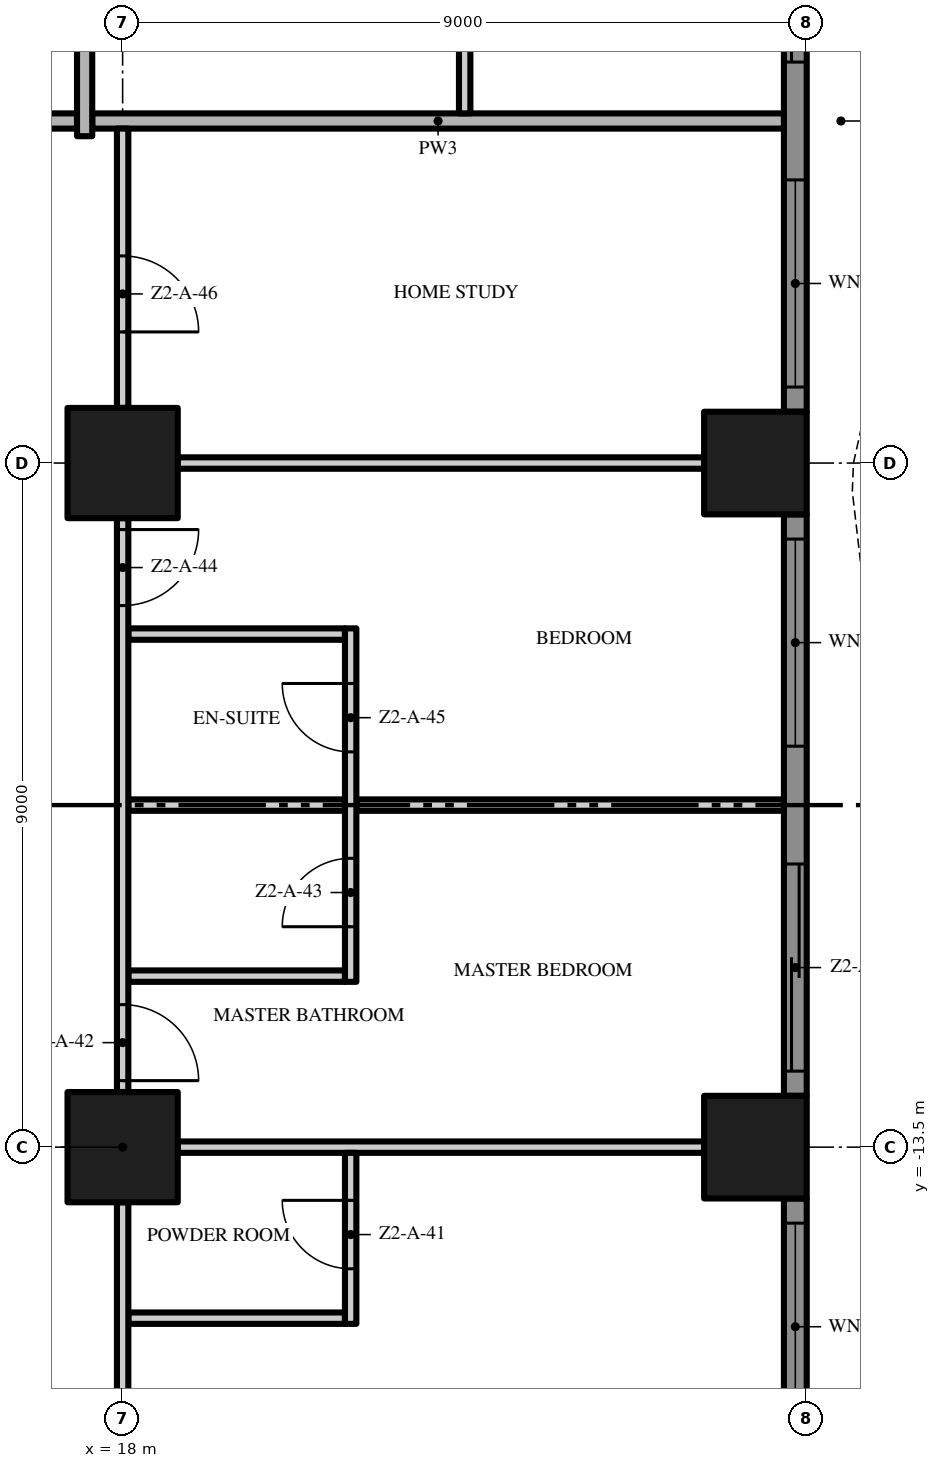
"""IFC4 building model, lengths in metres.
Left out: names, types, materials, properties, quantities, classifications, styles, units other than length and angle.
Written with IfcOpenShell. Run it as: python <this file> out.ifc"""

import sys

from ifc_helpers import new_model, si_unit, direction, frame, frame_2d, origin, origin_2d, place, context, subcontext, project, spatial, polyline, rectangle, outline, extrude, element, fill, save


model = new_model("IFC4")
c1 = context("Model", 3, precision=1e-05, world=origin(), true_north=direction((0.0, 1.0)))
c2 = subcontext(c1, "Body", "Model", "MODEL_VIEW")
j1 = project(units=[si_unit("LENGTHUNIT", "METRE"), si_unit("PLANEANGLEUNIT", "RADIAN")], contexts=[c1])
p1 = place(None, origin())
s1 = spatial("IfcSite", under=j1, at=p1, CompositionType="ELEMENT")
p2 = place(p1, origin())
s2 = spatial("IfcBuilding", under=s1, at=p2, CompositionType="ELEMENT")
p3 = place(p2, frame((0.0, 0.0, 73.2)))
s3 = spatial("IfcBuildingStorey", under=s2, at=p3, CompositionType="ELEMENT", Elevation=73.2)
for number, where, z_axis, x_axis in (
    (1, (18.0, -13.5, 0.0), (0.0, 0.0, 1.0), (1.0, 0.0, 0.0)),
    (2, (18.0, -4.5, 0.0), (0.0, 0.0, 1.0), (1.0, 0.0, 0.0)),
):
    element("IfcColumn", number, at=place(p3, frame(where, z_axis=z_axis, x_axis=x_axis)), inside=s3, PredefinedType="COLUMN", context=c2, shape_type="SweptSolid", body=[
        extrude(rectangle(XDim=1.45, YDim=1.45, at=origin_2d()), origin(), (0.0, 0.0, 1.0), 3.5),
    ])
for number, where, z_axis, x_axis in (
    (3, (26.325, -13.5, 0.0), (0.0, 0.0, 1.0), (1.0, 0.0, 0.0)),
    (4, (26.325, -4.5, 0.0), (0.0, 0.0, 1.0), (1.0, 0.0, 0.0)),
):
    element("IfcColumn", number, at=place(p3, frame(where, z_axis=z_axis, x_axis=x_axis)), inside=s3, PredefinedType="COLUMN", context=c2, shape_type="SweptSolid", body=[
        extrude(rectangle(XDim=1.35, YDim=1.35, at=origin_2d()), origin(), (0.0, 0.0, 1.0), 3.5),
    ])
p4 = place(p3, frame((26.85, -14.175, 0.0), z_axis=(0.0, 0.0, 1.0), x_axis=(0.0, -1.0, 0.0)))
e5 = element("IfcWall", 5, at=p4, inside=s3, PredefinedType="SOLIDWALL", context=c2, shape_type="SweptSolid", body=[
    extrude(rectangle(XDim=3.525, YDim=0.3, at=frame_2d((1.762, 0.0))), origin(), (0.0, 0.0, 1.0), 3.5),
])
p5 = place(p4, frame((0.325, 0.0, 0.45)))
e6 = element("IfcOpeningElement", 6, at=p5, cuts=e5, PredefinedType="OPENING", context=c2, shape_type="SweptSolid", body=[
    extrude(rectangle(XDim=2.725, YDim=2.65, at=frame_2d((1.363, 1.325))), frame((0.0, 0.16, 0.0), z_axis=(0.0, -1.0, 0.0), x_axis=(1.0, 0.0, 0.0)), (0.0, 0.0, 1.0), 0.32),
])
p6 = place(p3, frame((26.85, -5.175, 0.0), z_axis=(0.0, 0.0, 1.0), x_axis=(0.0, -1.0, 0.0)))
e7 = element("IfcWall", 7, at=p6, inside=s3, PredefinedType="SOLIDWALL", context=c2, shape_type="SweptSolid", body=[
    extrude(rectangle(XDim=7.65, YDim=0.3, at=frame_2d((3.825, 0.0))), origin(), (0.0, 0.0, 1.0), 3.5),
])
p7 = place(p6, frame((4.6, 0.0, 0.0)))
e8 = element("IfcOpeningElement", 8, at=p7, cuts=e7, PredefinedType="OPENING", context=c2, shape_type="SweptSolid", body=[
    extrude(rectangle(XDim=2.725, YDim=2.4, at=frame_2d((1.363, 1.2))), frame((0.0, 0.16, 0.0), z_axis=(0.0, -1.0, 0.0), x_axis=(1.0, 0.0, 0.0)), (0.0, 0.0, 1.0), 0.32),
])
p8 = place(p6, frame((0.325, 0.0, 0.45)))
e9 = element("IfcOpeningElement", 9, at=p8, cuts=e7, PredefinedType="OPENING", context=c2, shape_type="SweptSolid", body=[
    extrude(rectangle(XDim=2.725, YDim=2.65, at=frame_2d((1.363, 1.325))), frame((0.0, 0.16, 0.0), z_axis=(0.0, -1.0, 0.0), x_axis=(1.0, 0.0, 0.0)), (0.0, 0.0, 1.0), 0.32),
])
p9 = place(p3, frame((26.85, 3.825, 0.0), z_axis=(0.0, 0.0, 1.0), x_axis=(0.0, -1.0, 0.0)))
e10 = element("IfcWall", 10, at=p9, inside=s3, PredefinedType="SOLIDWALL", context=c2, shape_type="SweptSolid", body=[
    extrude(rectangle(XDim=7.65, YDim=0.3, at=frame_2d((3.825, 0.0))), origin(), (0.0, 0.0, 1.0), 3.5),
])
p10 = place(p9, frame((4.6, 0.0, 0.45)))
e11 = element("IfcOpeningElement", 11, at=p10, cuts=e10, PredefinedType="OPENING", context=c2, shape_type="SweptSolid", body=[
    extrude(rectangle(XDim=2.725, YDim=2.65, at=frame_2d((1.363, 1.325))), frame((0.0, 0.16, 0.0), z_axis=(0.0, -1.0, 0.0), x_axis=(1.0, 0.0, 0.0)), (0.0, 0.0, 1.0), 0.32),
])
p11 = place(p9, frame((0.325, 0.0, 0.0)))
e12 = element("IfcOpeningElement", 12, at=p11, cuts=e10, PredefinedType="OPENING", context=c2, shape_type="SweptSolid", body=[
    extrude(rectangle(XDim=2.725, YDim=2.4, at=frame_2d((1.363, 1.2))), frame((0.0, 0.16, 0.0), z_axis=(0.0, -1.0, 0.0), x_axis=(1.0, 0.0, 0.0)), (0.0, 0.0, 1.0), 0.32),
])
p12 = place(p3, origin())
e13 = element("IfcWall", 13, at=p12, inside=s3, PredefinedType="USERDEFINED", context=c2, shape_type="SweptSolid", body=[
    extrude(outline(polyline([(27.951, -18.0), (28.612, -16.5), (29.345, -15.0), (29.869, -13.5), (30.0, -12.375), (29.985, -12.0), (29.649, -10.5), (28.988, -9.0), (28.255, -7.5), (27.731, -6.0), (27.6, -4.875), (27.615, -4.5), (27.951, -3.0), (28.612, -1.5), (29.345, 0.0), (29.869, 1.5), (30.0, 2.625), (29.985, 3.0), (29.649, 4.5), (28.988, 6.0), (28.255, 7.5), (27.731, 9.0), (27.6, 10.125), (27.615, 10.5), (27.951, 12.0), (28.612, 13.5), (29.345, 15.0), (29.869, 16.5), (30.0, 17.625), (29.985, 18.0), (29.735, 17.99), (29.749, 17.635), (29.624, 16.556), (29.114, 15.096), (28.385, 13.605), (27.713, 12.079), (27.366, 10.533), (27.349, 10.115), (27.486, 8.944), (28.024, 7.404), (28.761, 5.895), (29.41, 4.421), (29.736, 2.967), (29.749, 2.635), (29.624, 1.556), (29.114, 0.096), (28.385, -1.395), (27.713, -2.921), (27.366, -4.467), (27.349, -4.885), (27.486, -6.056), (28.024, -7.596), (28.761, -9.105), (29.41, -10.579), (29.736, -12.033), (29.749, -12.365), (29.624, -13.444), (29.114, -14.904), (28.385, -16.395), (27.723, -17.899), (27.951, -18.0)])), origin(), (0.0, 0.0, 1.0), 0.9),
])
p13 = place(p3, frame((18.075, -15.75, 0.0), z_axis=(0.0, 0.0, 1.0), x_axis=(1.0, 0.0, 0.0)))
e14 = element("IfcWall", 14, at=p13, inside=s3, PredefinedType="PARTITIONING", context=c2, shape_type="SweptSolid", body=[
    extrude(rectangle(XDim=2.85, YDim=0.15, at=frame_2d((1.425, 0.0))), origin(), (0.0, 0.0, 1.0), 3.5),
])
p14 = place(p3, frame((18.725, -13.5, 0.0), z_axis=(0.0, 0.0, 1.0), x_axis=(1.0, 0.0, 0.0)))
e15 = element("IfcWall", 15, at=p14, inside=s3, PredefinedType="PARTITIONING", context=c2, shape_type="SweptSolid", body=[
    extrude(rectangle(XDim=6.925, YDim=0.15, at=frame_2d((3.462, 0.0))), origin(), (0.0, 0.0, 1.0), 3.5),
])
for number, where, z_axis, x_axis in (
    (16, (18.075, -11.25, 0.0), (0.0, 0.0, 1.0), (1.0, 0.0, 0.0)),
    (17, (18.075, -9.0, 0.0), (0.0, 0.0, 1.0), (1.0, 0.0, 0.0)),
):
    element("IfcWall", number, at=place(p3, frame(where, z_axis=z_axis, x_axis=x_axis)), inside=s3, PredefinedType="PARTITIONING", context=c2, shape_type="SweptSolid", body=[
        extrude(rectangle(XDim=2.85, YDim=0.15, at=frame_2d((1.425, 0.0))), origin(), (0.0, 0.0, 1.0), 3.5),
    ])
p15 = place(p3, frame((21.075, -9.0, 0.0), z_axis=(0.0, 0.0, 1.0), x_axis=(1.0, 0.0, 0.0)))
e18 = element("IfcWall", 18, at=p15, inside=s3, PredefinedType="PARTITIONING", context=c2, shape_type="SweptSolid", body=[
    extrude(rectangle(XDim=5.625, YDim=0.15, at=frame_2d((2.812, 0.0))), origin(), (0.0, 0.0, 1.0), 3.5),
])
p16 = place(p3, frame((18.075, -6.75, 0.0), z_axis=(0.0, 0.0, 1.0), x_axis=(1.0, 0.0, 0.0)))
e19 = element("IfcWall", 19, at=p16, inside=s3, PredefinedType="PARTITIONING", context=c2, shape_type="SweptSolid", body=[
    extrude(rectangle(XDim=2.85, YDim=0.15, at=frame_2d((1.425, 0.0))), origin(), (0.0, 0.0, 1.0), 3.5),
])
p17 = place(p3, frame((18.725, -4.5, 0.0), z_axis=(0.0, 0.0, 1.0), x_axis=(1.0, 0.0, 0.0)))
e20 = element("IfcWall", 20, at=p17, inside=s3, PredefinedType="PARTITIONING", context=c2, shape_type="SweptSolid", body=[
    extrude(rectangle(XDim=6.925, YDim=0.15, at=frame_2d((3.462, 0.0))), origin(), (0.0, 0.0, 1.0), 3.5),
])
p18 = place(p3, frame((4.6, 0.0, 0.0), z_axis=(0.0, 0.0, 1.0), x_axis=(1.0, 0.0, 0.0)))
e21 = element("IfcWall", 21, at=p18, inside=s3, PredefinedType="PARTITIONING", context=c2, shape_type="SweptSolid", body=[
    extrude(rectangle(XDim=12.8, YDim=0.2, at=frame_2d((6.4, 0.0))), origin(), (0.0, 0.0, 1.0), 3.5),
])
p19 = place(p3, frame((17.6, 0.0, 0.0), z_axis=(0.0, 0.0, 1.0), x_axis=(1.0, 0.0, 0.0)))
e22 = element("IfcWall", 22, at=p19, inside=s3, PredefinedType="PARTITIONING", context=c2, shape_type="SweptSolid", body=[
    extrude(rectangle(XDim=9.1, YDim=0.2, at=frame_2d((4.55, 0.0))), origin(), (0.0, 0.0, 1.0), 3.5),
])
p20 = place(p3, frame((17.5, -0.2, 0.0), z_axis=(0.0, 0.0, 1.0), x_axis=(0.0, 1.0, 0.0)))
e23 = element("IfcWall", 23, at=p20, inside=s3, PredefinedType="PARTITIONING", context=c2, shape_type="SweptSolid", body=[
    extrude(rectangle(XDim=3.975, YDim=0.2, at=frame_2d((1.988, 0.0))), origin(), (0.0, 0.0, 1.0), 3.5),
])
p21 = place(p3, frame((18.0, -14.225, 0.0), z_axis=(0.0, 0.0, 1.0), x_axis=(0.0, -1.0, 0.0)))
e24 = element("IfcWall", 24, at=p21, inside=s3, PredefinedType="PARTITIONING", context=c2, shape_type="SweptSolid", body=[
    extrude(rectangle(XDim=6.925, YDim=0.15, at=frame_2d((3.462, 0.0))), origin(), (0.0, 0.0, 1.0), 3.5),
])
p22 = place(p21, frame((4.025, 0.0, 0.0)))
e25 = element("IfcOpeningElement", 25, at=p22, cuts=e24, PredefinedType="OPENING", context=c2, shape_type="SweptSolid", body=[
    extrude(rectangle(XDim=1.8, YDim=2.4, at=frame_2d((0.9, 1.2))), frame((0.0, 0.085, 0.0), z_axis=(0.0, -1.0, 0.0), x_axis=(1.0, 0.0, 0.0)), (0.0, 0.0, 1.0), 0.17),
])
p23 = place(p3, frame((18.0, -5.225, 0.0), z_axis=(0.0, 0.0, 1.0), x_axis=(0.0, -1.0, 0.0)))
e26 = element("IfcWall", 26, at=p23, inside=s3, PredefinedType="PARTITIONING", context=c2, shape_type="SweptSolid", body=[
    extrude(rectangle(XDim=7.55, YDim=0.15, at=frame_2d((3.775, 0.0))), origin(), (0.0, 0.0, 1.0), 3.5),
])
p24 = place(p23, frame((6.4, 0.0, 0.0)))
e27 = element("IfcOpeningElement", 27, at=p24, cuts=e26, PredefinedType="OPENING", context=c2, shape_type="SweptSolid", body=[
    extrude(rectangle(XDim=1.0, YDim=2.4, at=frame_2d((0.5, 1.2))), frame((0.0, 0.085, 0.0), z_axis=(0.0, -1.0, 0.0), x_axis=(1.0, 0.0, 0.0)), (0.0, 0.0, 1.0), 0.17),
])
p25 = place(p23, frame((0.15, 0.0, 0.0)))
e28 = element("IfcOpeningElement", 28, at=p25, cuts=e26, PredefinedType="OPENING", context=c2, shape_type="SweptSolid", body=[
    extrude(rectangle(XDim=1.0, YDim=2.4, at=frame_2d((0.5, 1.2))), frame((0.0, 0.085, 0.0), z_axis=(0.0, -1.0, 0.0), x_axis=(1.0, 0.0, 0.0)), (0.0, 0.0, 1.0), 0.17),
])
p26 = place(p3, frame((18.0, -0.1, 0.0), z_axis=(0.0, 0.0, 1.0), x_axis=(0.0, -1.0, 0.0)))
e29 = element("IfcWall", 29, at=p26, inside=s3, PredefinedType="PARTITIONING", context=c2, shape_type="SweptSolid", body=[
    extrude(rectangle(XDim=3.675, YDim=0.15, at=frame_2d((1.837, 0.0))), origin(), (0.0, 0.0, 1.0), 3.5),
])
p27 = place(p26, frame((1.675, 0.0, 0.0)))
e30 = element("IfcOpeningElement", 30, at=p27, cuts=e29, PredefinedType="OPENING", context=c2, shape_type="SweptSolid", body=[
    extrude(rectangle(XDim=1.0, YDim=2.4, at=frame_2d((0.5, 1.2))), frame((0.0, 0.085, 0.0), z_axis=(0.0, -1.0, 0.0), x_axis=(1.0, 0.0, 0.0)), (0.0, 0.0, 1.0), 0.17),
])
p28 = place(p3, frame((21.0, -15.825, 0.0), z_axis=(0.0, 0.0, 1.0), x_axis=(0.0, 1.0, 0.0)))
e31 = element("IfcWall", 31, at=p28, inside=s3, PredefinedType="PARTITIONING", context=c2, shape_type="SweptSolid", body=[
    extrude(rectangle(XDim=2.25, YDim=0.15, at=frame_2d((1.125, 0.0))), origin(), (0.0, 0.0, 1.0), 3.5),
])
p29 = place(p28, frame((0.725, 0.0, 0.0)))
e32 = element("IfcOpeningElement", 32, at=p29, cuts=e31, PredefinedType="OPENING", context=c2, shape_type="SweptSolid", body=[
    extrude(rectangle(XDim=0.9, YDim=2.1, at=frame_2d((0.45, 1.05))), frame((0.0, 0.085, 0.0), z_axis=(0.0, -1.0, 0.0), x_axis=(1.0, 0.0, 0.0)), (0.0, 0.0, 1.0), 0.17),
])
p30 = place(p3, frame((21.0, -11.325, 0.0), z_axis=(0.0, 0.0, 1.0), x_axis=(0.0, 1.0, 0.0)))
e33 = element("IfcWall", 33, at=p30, inside=s3, PredefinedType="PARTITIONING", context=c2, shape_type="SweptSolid", body=[
    extrude(rectangle(XDim=4.65, YDim=0.15, at=frame_2d((2.325, 0.0))), origin(), (0.0, 0.0, 1.0), 3.5),
])
p31 = place(p30, frame((0.725, 0.0, 0.0)))
e34 = element("IfcOpeningElement", 34, at=p31, cuts=e33, PredefinedType="OPENING", context=c2, shape_type="SweptSolid", body=[
    extrude(rectangle(XDim=0.9, YDim=2.1, at=frame_2d((0.45, 1.05))), frame((0.0, 0.085, 0.0), z_axis=(0.0, -1.0, 0.0), x_axis=(1.0, 0.0, 0.0)), (0.0, 0.0, 1.0), 0.17),
])
p32 = place(p30, frame((3.025, 0.0, 0.0)))
e35 = element("IfcOpeningElement", 35, at=p32, cuts=e33, PredefinedType="OPENING", context=c2, shape_type="SweptSolid", body=[
    extrude(rectangle(XDim=0.9, YDim=2.1, at=frame_2d((0.45, 1.05))), frame((0.0, 0.085, 0.0), z_axis=(0.0, -1.0, 0.0), x_axis=(1.0, 0.0, 0.0)), (0.0, 0.0, 1.0), 0.17),
])
p33 = place(p3, frame((22.5, 17.325, 0.0), z_axis=(0.0, 0.0, 1.0), x_axis=(0.0, -1.0, 0.0)))
e36 = element("IfcWall", 36, at=p33, inside=s3, PredefinedType="PARTITIONING", context=c2, shape_type="SweptSolid", body=[
    extrude(rectangle(XDim=17.225, YDim=0.15, at=frame_2d((8.613, 0.0))), origin(), (0.0, 0.0, 1.0), 3.5),
])
p34 = place(p33, frame((14.575, 0.0, 0.0)))
e37 = element("IfcOpeningElement", 37, at=p34, cuts=e36, PredefinedType="OPENING", context=c2, shape_type="SweptSolid", body=[
    extrude(rectangle(XDim=1.0, YDim=2.4, at=frame_2d((0.5, 1.2))), frame((0.0, 0.085, 0.0), z_axis=(0.0, -1.0, 0.0), x_axis=(1.0, 0.0, 0.0)), (0.0, 0.0, 1.0), 0.17),
])
p35 = place(p33, frame((7.425, 0.0, 0.0)))
e38 = element("IfcOpeningElement", 38, at=p35, cuts=e36, PredefinedType="OPENING", context=c2, shape_type="SweptSolid", body=[
    extrude(rectangle(XDim=1.8, YDim=2.4, at=frame_2d((0.9, 1.2))), frame((0.0, 0.085, 0.0), z_axis=(0.0, -1.0, 0.0), x_axis=(1.0, 0.0, 0.0)), (0.0, 0.0, 1.0), 0.17),
])
p36 = place(p33, frame((0.15, 0.0, 0.0)))
e39 = element("IfcOpeningElement", 39, at=p36, cuts=e36, PredefinedType="OPENING", context=c2, shape_type="SweptSolid", body=[
    extrude(rectangle(XDim=1.0, YDim=2.4, at=frame_2d((0.5, 1.2))), frame((0.0, 0.085, 0.0), z_axis=(0.0, -1.0, 0.0), x_axis=(1.0, 0.0, 0.0)), (0.0, 0.0, 1.0), 0.17),
])
p37 = place(p5, origin())
e40 = element("IfcWindow", 40, at=p37, inside=s3, PartitioningType="SINGLE_PANEL", PredefinedType="WINDOW", context=c2, shape_type="SweptSolid", body=[
    extrude(rectangle(XDim=2.725, YDim=2.65, at=frame_2d((1.363, 1.325))), frame((0.0, 0.03, 0.0), z_axis=(0.0, -1.0, 0.0), x_axis=(1.0, 0.0, 0.0)), (0.0, 0.0, 1.0), 0.06),
])
fill(e6, e40)
p38 = place(p7, origin())
e41 = element("IfcDoor", 41, at=p38, inside=s3, OperationType="SINGLE_SWING_LEFT", PredefinedType="DOOR", context=c2, shape_type="SweptSolid", body=[
    extrude(rectangle(XDim=2.725, YDim=2.4, at=frame_2d((1.363, 1.2))), frame((0.0, 0.025, 0.0), z_axis=(0.0, -1.0, 0.0), x_axis=(1.0, 0.0, 0.0)), (0.0, 0.0, 1.0), 0.05),
])
fill(e8, e41)
p39 = place(p8, origin())
e42 = element("IfcWindow", 42, at=p39, inside=s3, PartitioningType="SINGLE_PANEL", PredefinedType="WINDOW", context=c2, shape_type="SweptSolid", body=[
    extrude(rectangle(XDim=2.725, YDim=2.65, at=frame_2d((1.363, 1.325))), frame((0.0, 0.03, 0.0), z_axis=(0.0, -1.0, 0.0), x_axis=(1.0, 0.0, 0.0)), (0.0, 0.0, 1.0), 0.06),
])
fill(e9, e42)
p40 = place(p10, origin())
e43 = element("IfcWindow", 43, at=p40, inside=s3, PartitioningType="SINGLE_PANEL", PredefinedType="WINDOW", context=c2, shape_type="SweptSolid", body=[
    extrude(rectangle(XDim=2.725, YDim=2.65, at=frame_2d((1.363, 1.325))), frame((0.0, 0.03, 0.0), z_axis=(0.0, -1.0, 0.0), x_axis=(1.0, 0.0, 0.0)), (0.0, 0.0, 1.0), 0.06),
])
fill(e11, e43)
p41 = place(p11, origin())
e44 = element("IfcDoor", 44, at=p41, inside=s3, OperationType="SINGLE_SWING_LEFT", PredefinedType="DOOR", context=c2, shape_type="SweptSolid", body=[
    extrude(rectangle(XDim=2.725, YDim=2.4, at=frame_2d((1.363, 1.2))), frame((0.0, 0.025, 0.0), z_axis=(0.0, -1.0, 0.0), x_axis=(1.0, 0.0, 0.0)), (0.0, 0.0, 1.0), 0.05),
])
fill(e12, e44)
p42 = place(p29, origin())
e45 = element("IfcDoor", 45, at=p42, inside=s3, OperationType="SINGLE_SWING_RIGHT", PredefinedType="DOOR", context=c2, shape_type="SweptSolid", body=[
    extrude(rectangle(XDim=0.9, YDim=2.1, at=frame_2d((0.45, 1.05))), frame((0.0, 0.025, 0.0), z_axis=(0.0, -1.0, 0.0), x_axis=(1.0, 0.0, 0.0)), (0.0, 0.0, 1.0), 0.05),
])
fill(e32, e45)
p43 = place(p24, origin())
e46 = element("IfcDoor", 46, at=p43, inside=s3, OperationType="SINGLE_SWING_RIGHT", PredefinedType="DOOR", context=c2, shape_type="SweptSolid", body=[
    extrude(rectangle(XDim=1.0, YDim=2.4, at=frame_2d((0.5, 1.2))), frame((0.0, 0.025, 0.0), z_axis=(0.0, -1.0, 0.0), x_axis=(1.0, 0.0, 0.0)), (0.0, 0.0, 1.0), 0.05),
])
fill(e27, e46)
p44 = place(p31, origin())
e47 = element("IfcDoor", 47, at=p44, inside=s3, OperationType="SINGLE_SWING_LEFT", PredefinedType="DOOR", context=c2, shape_type="SweptSolid", body=[
    extrude(rectangle(XDim=0.9, YDim=2.1, at=frame_2d((0.45, 1.05))), frame((0.0, 0.025, 0.0), z_axis=(0.0, -1.0, 0.0), x_axis=(1.0, 0.0, 0.0)), (0.0, 0.0, 1.0), 0.05),
])
fill(e34, e47)
p45 = place(p25, origin())
e48 = element("IfcDoor", 48, at=p45, inside=s3, OperationType="SINGLE_SWING_LEFT", PredefinedType="DOOR", context=c2, shape_type="SweptSolid", body=[
    extrude(rectangle(XDim=1.0, YDim=2.4, at=frame_2d((0.5, 1.2))), frame((0.0, 0.025, 0.0), z_axis=(0.0, -1.0, 0.0), x_axis=(1.0, 0.0, 0.0)), (0.0, 0.0, 1.0), 0.05),
])
fill(e28, e48)
p46 = place(p32, origin())
e49 = element("IfcDoor", 49, at=p46, inside=s3, OperationType="SINGLE_SWING_RIGHT", PredefinedType="DOOR", context=c2, shape_type="SweptSolid", body=[
    extrude(rectangle(XDim=0.9, YDim=2.1, at=frame_2d((0.45, 1.05))), frame((0.0, 0.025, 0.0), z_axis=(0.0, -1.0, 0.0), x_axis=(1.0, 0.0, 0.0)), (0.0, 0.0, 1.0), 0.05),
])
fill(e35, e49)
p47 = place(p27, origin())
e50 = element("IfcDoor", 50, at=p47, inside=s3, OperationType="SINGLE_SWING_RIGHT", PredefinedType="DOOR", context=c2, shape_type="SweptSolid", body=[
    extrude(rectangle(XDim=1.0, YDim=2.4, at=frame_2d((0.5, 1.2))), frame((0.0, 0.025, 0.0), z_axis=(0.0, -1.0, 0.0), x_axis=(1.0, 0.0, 0.0)), (0.0, 0.0, 1.0), 0.05),
])
fill(e30, e50)
save(model, sys.argv[1])
